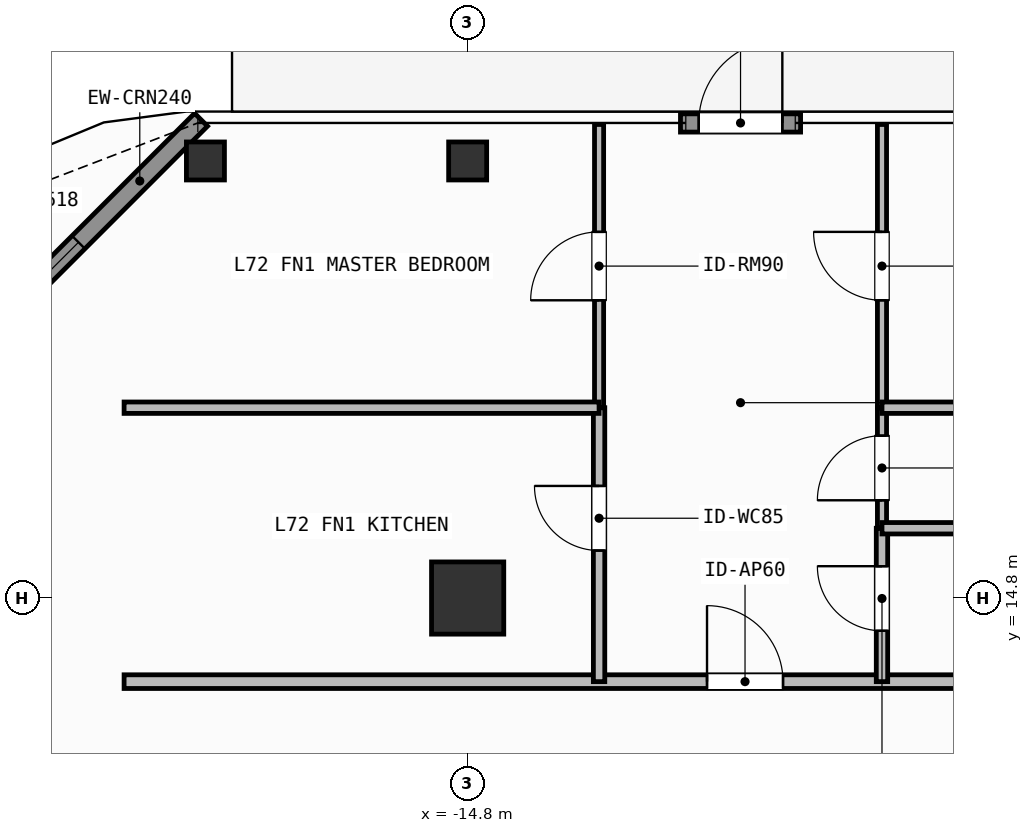
"""IFC4 building model, lengths in metres.
Left out: names, types, materials, properties, quantities, classifications, styles, units other than length and angle.
Written with IfcOpenShell. Run it as: python <this file> out.ifc"""

import sys

from ifc_helpers import new_model, si_unit, direction, frame, frame_2d, origin, origin_2d, place, context, subcontext, project, spatial, rectangle, hollow_rectangle, extrude, element, fill, save


model = new_model("IFC4")
c1 = context("Model", 3, precision=1e-05, world=origin(), true_north=direction((0.0, 1.0)))
c2 = subcontext(c1, "Body", "Model", "MODEL_VIEW")
j1 = project(units=[si_unit("LENGTHUNIT", "METRE"), si_unit("PLANEANGLEUNIT", "RADIAN")], contexts=[c1])
p1 = place(None, origin())
s1 = spatial("IfcSite", under=j1, at=p1, CompositionType="ELEMENT")
p2 = place(p1, origin())
s2 = spatial("IfcBuilding", under=s1, at=p2, CompositionType="ELEMENT")
p3 = place(p2, frame((0.0, 0.0, 293.7)))
s3 = spatial("IfcBuildingStorey", under=s2, at=p3, CompositionType="ELEMENT", Elevation=293.7)
p4 = place(p3, frame((-14.8, 14.8, 0.0), z_axis=(0.0, 0.0, 1.0), x_axis=(1.0, 0.0, 0.0)))
e1 = element("IfcColumn", 1, at=p4, inside=s3, PredefinedType="COLUMN", context=c2, shape_type="SweptSolid", body=[
    extrude(rectangle(XDim=0.95, YDim=0.95, at=origin_2d()), origin(), (0.0, 0.0, 1.0), 3.9),
])
for number, where, z_axis, x_axis in (
    (2, (-18.25, 20.55, 0.0), (0.0, 0.0, 1.0), (1.0, 0.0, 0.0)),
    (3, (-14.8, 20.55, 0.0), (0.0, 0.0, 1.0), (1.0, 0.0, 0.0)),
):
    element("IfcColumn", number, at=place(p3, frame(where, z_axis=z_axis, x_axis=x_axis)), inside=s3, PredefinedType="COLUMN", context=c2, shape_type="SweptSolid", body=[
        extrude(hollow_rectangle(XDim=0.5, YDim=0.5, WallThickness=0.025, at=origin_2d()), origin(), (0.0, 0.0, 1.0), 3.9),
    ])
p5 = place(p3, frame((-12.0, 21.05, 0.0), z_axis=(0.0, 0.0, 1.0), x_axis=(1.0, 0.0, 0.0)))
e4 = element("IfcWall", 4, at=p5, inside=s3, PredefinedType="SOLIDWALL", context=c2, shape_type="SweptSolid", body=[
    extrude(rectangle(XDim=1.58, YDim=0.24, at=frame_2d((0.79, 0.0))), origin(), (0.0, 0.0, 1.0), 3.68),
])
p6 = place(p5, frame((0.24, 0.0, 0.0)))
e5 = element("IfcOpeningElement", 5, at=p6, cuts=e4, PredefinedType="OPENING", context=c2, shape_type="SweptSolid", body=[
    extrude(rectangle(XDim=1.1, YDim=2.2, at=frame_2d((0.55, 1.1))), frame((0.0, 0.13, 0.0), z_axis=(0.0, -1.0, 0.0), x_axis=(1.0, 0.0, 0.0)), (0.0, 0.0, 1.0), 0.26),
])
p7 = place(p3, frame((-22.592, 16.808, 0.0), z_axis=(0.0, 0.0, 1.0), x_axis=(0.707106781187, 0.707106781187, 0.0)))
e6 = element("IfcWall", 6, at=p7, inside=s3, PredefinedType="SOLIDWALL", context=c2, shape_type="SweptSolid", body=[
    extrude(rectangle(XDim=6.059, YDim=0.24, at=frame_2d((3.03, 0.0))), origin(), (0.0, 0.0, 1.0), 3.68),
])
p8 = place(p7, frame((2.28, 0.0, 0.8)))
e7 = element("IfcOpeningElement", 7, at=p8, cuts=e6, PredefinedType="OPENING", context=c2, shape_type="SweptSolid", body=[
    extrude(rectangle(XDim=1.5, YDim=1.85, at=frame_2d((0.75, 0.925))), frame((0.0, 0.13, 0.0), z_axis=(0.0, -1.0, 0.0), x_axis=(1.0, 0.0, 0.0)), (0.0, 0.0, 1.0), 0.26),
])
p9 = place(p3, frame((-19.32, 13.7, 0.0), z_axis=(0.0, 0.0, 1.0), x_axis=(1.0, 0.0, 0.0)))
e8 = element("IfcWall", 8, at=p9, inside=s3, PredefinedType="PARTITIONING", context=c2, shape_type="SweptSolid", body=[
    extrude(rectangle(XDim=15.623, YDim=0.18, at=frame_2d((7.812, 0.0))), origin(), (0.0, 0.0, 1.0), 3.68),
])
p10 = place(p9, frame((7.669, 0.0, 0.0)))
e9 = element("IfcOpeningElement", 9, at=p10, cuts=e8, PredefinedType="OPENING", context=c2, shape_type="SweptSolid", body=[
    extrude(rectangle(XDim=1.0, YDim=2.2, at=frame_2d((0.5, 1.1))), frame((0.0, 0.1, 0.0), z_axis=(0.0, -1.0, 0.0), x_axis=(1.0, 0.0, 0.0)), (0.0, 0.0, 1.0), 0.2),
])
p11 = place(p3, frame((-13.071, 13.7, 0.0), z_axis=(0.0, 0.0, 1.0), x_axis=(0.0, 1.0, 0.0)))
e10 = element("IfcWall", 10, at=p11, inside=s3, PredefinedType="PARTITIONING", context=c2, shape_type="SweptSolid", body=[
    extrude(rectangle(XDim=3.604, YDim=0.15, at=frame_2d((1.802, 0.0))), origin(), (0.0, 0.0, 1.0), 3.68),
])
p12 = place(p11, frame((1.725, 0.0, 0.0)))
e11 = element("IfcOpeningElement", 11, at=p12, cuts=e10, PredefinedType="OPENING", context=c2, shape_type="SweptSolid", body=[
    extrude(rectangle(XDim=0.85, YDim=2.1, at=frame_2d((0.425, 1.05))), frame((0.0, 0.085, 0.0), z_axis=(0.0, -1.0, 0.0), x_axis=(1.0, 0.0, 0.0)), (0.0, 0.0, 1.0), 0.17),
])
p13 = place(p3, frame((-13.071, 17.304, 0.0), z_axis=(0.0, 0.0, 1.0), x_axis=(0.0, 1.0, 0.0)))
e12 = element("IfcWall", 12, at=p13, inside=s3, PredefinedType="PARTITIONING", context=c2, shape_type="SweptSolid", body=[
    extrude(rectangle(XDim=3.726, YDim=0.12, at=frame_2d((1.863, 0.0))), origin(), (0.0, 0.0, 1.0), 3.68),
])
p14 = place(p13, frame((1.413, 0.0, 0.0)))
e13 = element("IfcOpeningElement", 13, at=p14, cuts=e12, PredefinedType="OPENING", context=c2, shape_type="SweptSolid", body=[
    extrude(rectangle(XDim=0.9, YDim=2.1, at=frame_2d((0.45, 1.05))), frame((0.0, 0.07, 0.0), z_axis=(0.0, -1.0, 0.0), x_axis=(1.0, 0.0, 0.0)), (0.0, 0.0, 1.0), 0.14),
])
p15 = place(p3, frame((-9.349, 13.7, 0.0), z_axis=(0.0, 0.0, 1.0), x_axis=(0.0, 1.0, 0.0)))
e14 = element("IfcWall", 14, at=p15, inside=s3, PredefinedType="PARTITIONING", context=c2, shape_type="SweptSolid", body=[
    extrude(rectangle(XDim=2.018, YDim=0.15, at=frame_2d((1.009, 0.0))), origin(), (0.0, 0.0, 1.0), 3.68),
])
p16 = place(p15, frame((0.669, 0.0, 0.0)))
e15 = element("IfcOpeningElement", 15, at=p16, cuts=e14, PredefinedType="OPENING", context=c2, shape_type="SweptSolid", body=[
    extrude(rectangle(XDim=0.85, YDim=2.1, at=frame_2d((0.425, 1.05))), frame((0.0, 0.085, 0.0), z_axis=(0.0, -1.0, 0.0), x_axis=(1.0, 0.0, 0.0)), (0.0, 0.0, 1.0), 0.17),
])
p17 = place(p3, frame((-9.349, 15.718, 0.0), z_axis=(0.0, 0.0, 1.0), x_axis=(0.0, 1.0, 0.0)))
e16 = element("IfcWall", 16, at=p17, inside=s3, PredefinedType="PARTITIONING", context=c2, shape_type="SweptSolid", body=[
    extrude(rectangle(XDim=1.586, YDim=0.12, at=frame_2d((0.793, 0.0))), origin(), (0.0, 0.0, 1.0), 3.68),
])
p18 = place(p17, frame((0.368, 0.0, 0.0)))
e17 = element("IfcOpeningElement", 17, at=p18, cuts=e16, PredefinedType="OPENING", context=c2, shape_type="SweptSolid", body=[
    extrude(rectangle(XDim=0.85, YDim=2.1, at=frame_2d((0.425, 1.05))), frame((0.0, 0.07, 0.0), z_axis=(0.0, -1.0, 0.0), x_axis=(1.0, 0.0, 0.0)), (0.0, 0.0, 1.0), 0.14),
])
p19 = place(p3, frame((-9.349, 17.304, 0.0), z_axis=(0.0, 0.0, 1.0), x_axis=(0.0, 1.0, 0.0)))
e18 = element("IfcWall", 18, at=p19, inside=s3, PredefinedType="PARTITIONING", context=c2, shape_type="SweptSolid", body=[
    extrude(rectangle(XDim=3.726, YDim=0.12, at=frame_2d((1.863, 0.0))), origin(), (0.0, 0.0, 1.0), 3.68),
])
p20 = place(p19, frame((1.413, 0.0, 0.0)))
e19 = element("IfcOpeningElement", 19, at=p20, cuts=e18, PredefinedType="OPENING", context=c2, shape_type="SweptSolid", body=[
    extrude(rectangle(XDim=0.9, YDim=2.1, at=frame_2d((0.45, 1.05))), frame((0.0, 0.07, 0.0), z_axis=(0.0, -1.0, 0.0), x_axis=(1.0, 0.0, 0.0)), (0.0, 0.0, 1.0), 0.14),
])
p21 = place(p3, frame((-19.32, 17.304, 0.0), z_axis=(0.0, 0.0, 1.0), x_axis=(1.0, 0.0, 0.0)))
e20 = element("IfcWall", 20, at=p21, inside=s3, PredefinedType="PARTITIONING", context=c2, shape_type="SweptSolid", body=[
    extrude(rectangle(XDim=6.249, YDim=0.15, at=frame_2d((3.125, 0.0))), origin(), (0.0, 0.0, 1.0), 3.68),
])
for number, where, z_axis, x_axis in (
    (21, (-9.349, 15.718, 0.0), (0.0, 0.0, 1.0), (1.0, 0.0, 0.0)),
    (22, (-9.349, 17.304, 0.0), (0.0, 0.0, 1.0), (1.0, 0.0, 0.0)),
):
    element("IfcWall", number, at=place(p3, frame(where, z_axis=z_axis, x_axis=x_axis)), inside=s3, PredefinedType="PARTITIONING", context=c2, shape_type="SweptSolid", body=[
        extrude(rectangle(XDim=5.652, YDim=0.15, at=frame_2d((2.826, 0.0))), origin(), (0.0, 0.0, 1.0), 3.68),
    ])
p22 = place(p6, origin())
e23 = element("IfcDoor", 23, at=p22, inside=s3, OperationType="SINGLE_SWING_RIGHT", PredefinedType="DOOR", context=c2, shape_type="SweptSolid", body=[
    extrude(rectangle(XDim=1.1, YDim=2.2, at=frame_2d((0.55, 1.1))), frame((0.0, 0.025, 0.0), z_axis=(0.0, -1.0, 0.0), x_axis=(1.0, 0.0, 0.0)), (0.0, 0.0, 1.0), 0.05),
])
fill(e5, e23)
p23 = place(p8, origin())
e24 = element("IfcWindow", 24, at=p23, inside=s3, PartitioningType="SINGLE_PANEL", PredefinedType="WINDOW", context=c2, shape_type="SweptSolid", body=[
    extrude(rectangle(XDim=1.5, YDim=1.85, at=frame_2d((0.75, 0.925))), frame((0.0, 0.03, 0.0), z_axis=(0.0, -1.0, 0.0), x_axis=(1.0, 0.0, 0.0)), (0.0, 0.0, 1.0), 0.06),
])
fill(e7, e24)
p24 = place(p10, origin())
e25 = element("IfcDoor", 25, at=p24, inside=s3, OperationType="SINGLE_SWING_LEFT", PredefinedType="DOOR", context=c2, shape_type="SweptSolid", body=[
    extrude(rectangle(XDim=1.0, YDim=2.2, at=frame_2d((0.5, 1.1))), frame((0.0, 0.025, 0.0), z_axis=(0.0, -1.0, 0.0), x_axis=(1.0, 0.0, 0.0)), (0.0, 0.0, 1.0), 0.05),
])
fill(e9, e25)
p25 = place(p12, origin())
e26 = element("IfcDoor", 26, at=p25, inside=s3, OperationType="SINGLE_SWING_RIGHT", PredefinedType="DOOR", context=c2, shape_type="SweptSolid", body=[
    extrude(rectangle(XDim=0.85, YDim=2.1, at=frame_2d((0.425, 1.05))), frame((0.0, 0.025, 0.0), z_axis=(0.0, -1.0, 0.0), x_axis=(1.0, 0.0, 0.0)), (0.0, 0.0, 1.0), 0.05),
])
fill(e11, e26)
p26 = place(p14, origin())
e27 = element("IfcDoor", 27, at=p26, inside=s3, OperationType="SINGLE_SWING_LEFT", PredefinedType="DOOR", context=c2, shape_type="SweptSolid", body=[
    extrude(rectangle(XDim=0.9, YDim=2.1, at=frame_2d((0.45, 1.05))), frame((0.0, 0.025, 0.0), z_axis=(0.0, -1.0, 0.0), x_axis=(1.0, 0.0, 0.0)), (0.0, 0.0, 1.0), 0.05),
])
fill(e13, e27)
p27 = place(p16, origin())
e28 = element("IfcDoor", 28, at=p27, inside=s3, OperationType="SINGLE_SWING_RIGHT", PredefinedType="DOOR", context=c2, shape_type="SweptSolid", body=[
    extrude(rectangle(XDim=0.85, YDim=2.1, at=frame_2d((0.425, 1.05))), frame((0.0, 0.025, 0.0), z_axis=(0.0, -1.0, 0.0), x_axis=(1.0, 0.0, 0.0)), (0.0, 0.0, 1.0), 0.05),
])
fill(e15, e28)
p28 = place(p18, origin())
e29 = element("IfcDoor", 29, at=p28, inside=s3, OperationType="SINGLE_SWING_LEFT", PredefinedType="DOOR", context=c2, shape_type="SweptSolid", body=[
    extrude(rectangle(XDim=0.85, YDim=2.1, at=frame_2d((0.425, 1.05))), frame((0.0, 0.025, 0.0), z_axis=(0.0, -1.0, 0.0), x_axis=(1.0, 0.0, 0.0)), (0.0, 0.0, 1.0), 0.05),
])
fill(e17, e29)
p29 = place(p20, origin())
e30 = element("IfcDoor", 30, at=p29, inside=s3, OperationType="SINGLE_SWING_RIGHT", PredefinedType="DOOR", context=c2, shape_type="SweptSolid", body=[
    extrude(rectangle(XDim=0.9, YDim=2.1, at=frame_2d((0.45, 1.05))), frame((0.0, 0.025, 0.0), z_axis=(0.0, -1.0, 0.0), x_axis=(1.0, 0.0, 0.0)), (0.0, 0.0, 1.0), 0.05),
])
fill(e19, e30)
save(model, sys.argv[1])
